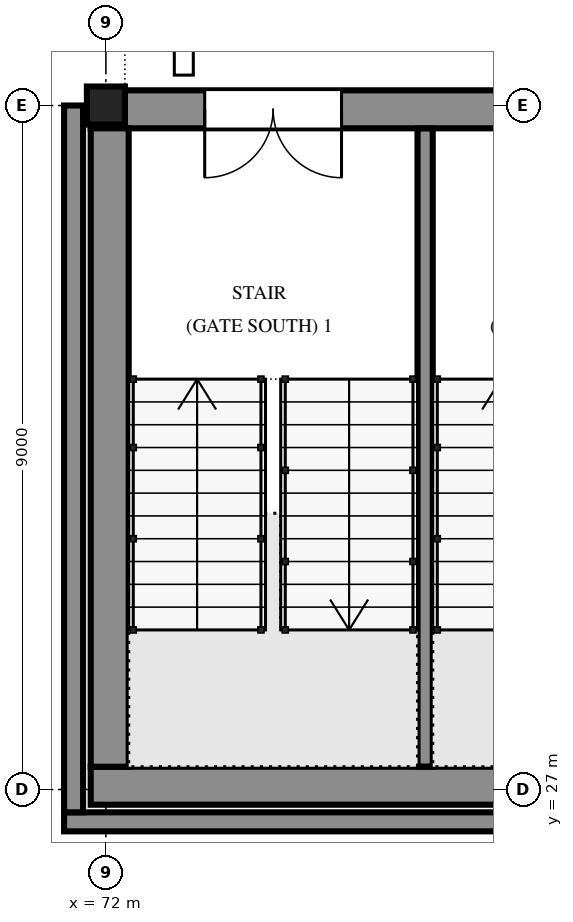
"""IFC4 building model, lengths in metres.
Left out: names, types, materials, properties, quantities, classifications, styles, units other than length and angle.
Written with IfcOpenShell. Run it as: python <this file> out.ifc"""

import sys

from ifc_helpers import new_model, si_unit, direction, frame, frame_2d, origin, origin_2d, place, context, subcontext, project, spatial, polyline, rectangle, hollow_rectangle, outline, extrude, element, fill, save


model = new_model("IFC4")
c1 = context("Model", 3, precision=1e-05, world=origin(), true_north=direction((0.0, 1.0)))
c2 = subcontext(c1, "Body", "Model", "MODEL_VIEW")
j1 = project(units=[si_unit("LENGTHUNIT", "METRE"), si_unit("PLANEANGLEUNIT", "RADIAN")], contexts=[c1])
p1 = place(None, origin())
s1 = spatial("IfcSite", under=j1, at=p1, CompositionType="ELEMENT")
p2 = place(p1, origin())
s2 = spatial("IfcBuilding", under=s1, at=p2, CompositionType="ELEMENT")
p3 = place(p2, frame((0.0, 0.0, 11.7)))
s3 = spatial("IfcBuildingStorey", under=s2, at=p3, CompositionType="ELEMENT", Elevation=11.7)
p4 = place(p3, frame((72.0, 36.0, 0.0), z_axis=(0.0, 0.0, 1.0), x_axis=(1.0, 0.0, 0.0)))
e1 = element("IfcColumn", 1, at=p4, inside=s3, PredefinedType="COLUMN", context=c2, shape_type="SweptSolid", body=[
    extrude(hollow_rectangle(XDim=0.5, YDim=0.5, WallThickness=0.032, at=origin_2d()), origin(), (0.0, 0.0, 1.0), 4.2),
])
p5 = place(p3, frame((71.8, 27.05, 0.0), z_axis=(0.0, 0.0, 1.0), x_axis=(1.0, 0.0, 0.0)))
e2 = element("IfcWall", 2, at=p5, inside=s3, PredefinedType="SOLIDWALL", context=c2, shape_type="SweptSolid", body=[
    extrude(rectangle(XDim=18.4, YDim=0.5, at=frame_2d((9.2, 0.0))), origin(), (0.0, 0.0, 1.0), 4.2),
])
p6 = place(p3, frame((71.8, 35.95, 0.0), z_axis=(0.0, 0.0, 1.0), x_axis=(1.0, 0.0, 0.0)))
e3 = element("IfcWall", 3, at=p6, inside=s3, PredefinedType="SOLIDWALL", context=c2, shape_type="SweptSolid", body=[
    extrude(rectangle(XDim=18.4, YDim=0.5, at=frame_2d((9.2, 0.0))), origin(), (0.0, 0.0, 1.0), 4.2),
])
p7 = place(p6, frame((1.5, 0.0, 0.0)))
e4 = element("IfcOpeningElement", 4, at=p7, cuts=e3, PredefinedType="OPENING", context=c2, shape_type="SweptSolid", body=[
    extrude(rectangle(XDim=1.8, YDim=2.1, at=frame_2d((0.9, 1.05))), frame((0.0, 0.26, 0.0), z_axis=(0.0, -1.0, 0.0), x_axis=(1.0, 0.0, 0.0)), (0.0, 0.0, 1.0), 0.52),
])
p8 = place(p6, frame((5.5, 0.0, 0.0)))
e5 = element("IfcOpeningElement", 5, at=p8, cuts=e3, PredefinedType="OPENING", context=c2, shape_type="SweptSolid", body=[
    extrude(rectangle(XDim=1.8, YDim=2.1, at=frame_2d((0.9, 1.05))), frame((0.0, 0.26, 0.0), z_axis=(0.0, -1.0, 0.0), x_axis=(1.0, 0.0, 0.0)), (0.0, 0.0, 1.0), 0.52),
])
p9 = place(p6, frame((9.0, 0.0, 0.0)))
e6 = element("IfcOpeningElement", 6, at=p9, cuts=e3, PredefinedType="OPENING", context=c2, shape_type="SweptSolid", body=[
    extrude(rectangle(XDim=1.8, YDim=2.1, at=frame_2d((0.9, 1.05))), frame((0.0, 0.26, 0.0), z_axis=(0.0, -1.0, 0.0), x_axis=(1.0, 0.0, 0.0)), (0.0, 0.0, 1.0), 0.52),
])
p10 = place(p6, frame((16.15, 0.0, 0.0)))
e7 = element("IfcOpeningElement", 7, at=p10, cuts=e3, PredefinedType="OPENING", context=c2, shape_type="SweptSolid", body=[
    extrude(rectangle(XDim=0.9, YDim=2.1, at=frame_2d((0.45, 1.05))), frame((0.0, 0.26, 0.0), z_axis=(0.0, -1.0, 0.0), x_axis=(1.0, 0.0, 0.0)), (0.0, 0.0, 1.0), 0.52),
])
p11 = place(p3, frame((72.05, 27.3, 0.0), z_axis=(0.0, 0.0, 1.0), x_axis=(0.0, 1.0, 0.0)))
e8 = element("IfcWall", 8, at=p11, inside=s3, PredefinedType="SOLIDWALL", context=c2, shape_type="SweptSolid", body=[
    extrude(rectangle(XDim=8.4, YDim=0.5, at=frame_2d((4.2, 0.0))), origin(), (0.0, 0.0, 1.0), 4.2),
])
p12 = place(p3, frame((71.45, 26.575, 0.0), z_axis=(0.0, 0.0, 1.0), x_axis=(1.0, 0.0, 0.0)))
e9 = element("IfcWall", 9, at=p12, inside=s3, PredefinedType="SOLIDWALL", context=c2, shape_type="SweptSolid", body=[
    extrude(outline(polyline([(0.0, 0.0), (19.1, 0.0), (19.1, 12.6), (0.0, 12.6), (0.0, 0.0)]), holes=[polyline([(1.308, 2.439), (1.352, 2.546), (1.408, 2.646), (1.475, 2.74), (1.552, 2.826), (1.638, 2.903), (1.732, 2.969), (1.833, 3.025), (1.939, 3.068), (2.05, 3.1), (2.161, 3.068), (2.267, 3.025), (2.368, 2.969), (2.462, 2.903), (2.549, 2.826), (2.625, 2.74), (2.692, 2.646), (2.748, 2.546), (2.792, 2.439), (2.824, 2.329), (2.844, 2.215), (2.85, 2.1), (2.85, 0.6), (1.25, 0.6), (1.25, 2.1), (1.257, 2.215), (1.276, 2.329), (1.308, 2.439)]), polyline([(4.308, 2.439), (4.352, 2.546), (4.408, 2.646), (4.475, 2.74), (4.552, 2.826), (4.638, 2.903), (4.732, 2.969), (4.833, 3.025), (4.939, 3.068), (5.05, 3.1), (5.161, 3.068), (5.267, 3.025), (5.368, 2.969), (5.462, 2.903), (5.549, 2.826), (5.625, 2.74), (5.692, 2.646), (5.748, 2.546), (5.792, 2.439), (5.824, 2.329), (5.844, 2.215), (5.85, 2.1), (5.85, 0.6), (4.25, 0.6), (4.25, 2.1), (4.257, 2.215), (4.276, 2.329), (4.308, 2.439)]), polyline([(7.308, 2.439), (7.352, 2.546), (7.408, 2.646), (7.475, 2.74), (7.552, 2.826), (7.638, 2.903), (7.732, 2.969), (7.833, 3.025), (7.939, 3.068), (8.05, 3.1), (8.161, 3.068), (8.267, 3.025), (8.368, 2.969), (8.462, 2.903), (8.549, 2.826), (8.625, 2.74), (8.692, 2.646), (8.748, 2.546), (8.792, 2.439), (8.824, 2.329), (8.844, 2.215), (8.85, 2.1), (8.85, 0.6), (7.25, 0.6), (7.25, 2.1), (7.257, 2.215), (7.276, 2.329), (7.308, 2.439)]), polyline([(1.308, 6.639), (1.352, 6.746), (1.408, 6.846), (1.475, 6.94), (1.552, 7.026), (1.638, 7.103), (1.732, 7.169), (1.833, 7.225), (1.939, 7.269), (2.05, 7.3), (2.161, 7.269), (2.267, 7.225), (2.368, 7.169), (2.462, 7.103), (2.549, 7.026), (2.625, 6.94), (2.692, 6.846), (2.748, 6.746), (2.792, 6.639), (2.824, 6.529), (2.844, 6.415), (2.85, 6.3), (2.85, 4.8), (1.25, 4.8), (1.25, 6.3), (1.257, 6.415), (1.276, 6.529), (1.308, 6.639)]), polyline([(4.308, 6.639), (4.352, 6.746), (4.408, 6.846), (4.475, 6.94), (4.552, 7.026), (4.638, 7.103), (4.732, 7.169), (4.833, 7.225), (4.939, 7.269), (5.05, 7.3), (5.161, 7.269), (5.267, 7.225), (5.368, 7.169), (5.462, 7.103), (5.549, 7.026), (5.625, 6.94), (5.692, 6.846), (5.748, 6.746), (5.792, 6.639), (5.824, 6.529), (5.844, 6.415), (5.85, 6.3), (5.85, 4.8), (4.25, 4.8), (4.25, 6.3), (4.257, 6.415), (4.276, 6.529), (4.308, 6.639)]), polyline([(7.308, 6.639), (7.352, 6.746), (7.408, 6.846), (7.475, 6.94), (7.552, 7.026), (7.638, 7.103), (7.732, 7.169), (7.833, 7.225), (7.939, 7.269), (8.05, 7.3), (8.161, 7.269), (8.267, 7.225), (8.368, 7.169), (8.462, 7.103), (8.549, 7.026), (8.625, 6.94), (8.692, 6.846), (8.748, 6.746), (8.792, 6.639), (8.824, 6.529), (8.844, 6.415), (8.85, 6.3), (8.85, 4.8), (7.25, 4.8), (7.25, 6.3), (7.257, 6.415), (7.276, 6.529), (7.308, 6.639)]), polyline([(1.308, 10.839), (1.352, 10.946), (1.408, 11.046), (1.475, 11.14), (1.552, 11.226), (1.638, 11.303), (1.732, 11.369), (1.833, 11.425), (1.939, 11.469), (2.05, 11.5), (2.161, 11.469), (2.267, 11.425), (2.368, 11.369), (2.462, 11.303), (2.549, 11.226), (2.625, 11.14), (2.692, 11.046), (2.748, 10.946), (2.792, 10.839), (2.824, 10.729), (2.844, 10.615), (2.85, 10.5), (2.85, 9.0), (1.25, 9.0), (1.25, 10.5), (1.257, 10.615), (1.276, 10.729), (1.308, 10.839)]), polyline([(4.352, 10.946), (4.408, 11.046), (4.475, 11.14), (4.552, 11.226), (4.638, 11.303), (4.732, 11.369), (4.833, 11.425), (4.939, 11.469), (5.05, 11.5), (5.161, 11.469), (5.267, 11.425), (5.368, 11.369), (5.462, 11.303), (5.549, 11.226), (5.625, 11.14), (5.692, 11.046), (5.748, 10.946), (5.792, 10.839), (5.824, 10.729), (5.844, 10.615), (5.85, 10.5), (5.85, 9.0), (4.25, 9.0), (4.25, 10.5), (4.257, 10.615), (4.276, 10.729), (4.308, 10.839), (4.352, 10.946)]), polyline([(7.352, 10.946), (7.408, 11.046), (7.475, 11.14), (7.552, 11.226), (7.638, 11.303), (7.732, 11.369), (7.833, 11.425), (7.939, 11.469), (8.05, 11.5), (8.161, 11.469), (8.267, 11.425), (8.368, 11.369), (8.462, 11.303), (8.549, 11.226), (8.625, 11.14), (8.692, 11.046), (8.748, 10.946), (8.792, 10.839), (8.824, 10.729), (8.844, 10.615), (8.85, 10.5), (8.85, 9.0), (7.25, 9.0), (7.25, 10.5), (7.257, 10.615), (7.276, 10.729), (7.308, 10.839), (7.352, 10.946)]), polyline([(10.308, 2.439), (10.352, 2.546), (10.408, 2.646), (10.475, 2.74), (10.552, 2.826), (10.638, 2.903), (10.732, 2.969), (10.833, 3.025), (10.939, 3.068), (11.05, 3.1), (11.161, 3.068), (11.267, 3.025), (11.368, 2.969), (11.462, 2.903), (11.549, 2.826), (11.625, 2.74), (11.692, 2.646), (11.748, 2.546), (11.792, 2.439), (11.824, 2.329), (11.844, 2.215), (11.85, 2.1), (11.85, 0.6), (10.25, 0.6), (10.25, 2.1), (10.257, 2.215), (10.276, 2.329), (10.308, 2.439)]), polyline([(13.308, 2.439), (13.352, 2.546), (13.408, 2.646), (13.475, 2.74), (13.552, 2.826), (13.638, 2.903), (13.732, 2.969), (13.833, 3.025), (13.939, 3.068), (14.05, 3.1), (14.161, 3.068), (14.267, 3.025), (14.368, 2.969), (14.462, 2.903), (14.549, 2.826), (14.625, 2.74), (14.692, 2.646), (14.748, 2.546), (14.792, 2.439), (14.824, 2.329), (14.844, 2.215), (14.85, 2.1), (14.85, 0.6), (13.25, 0.6), (13.25, 2.1), (13.257, 2.215), (13.276, 2.329), (13.308, 2.439)]), polyline([(16.308, 2.439), (16.352, 2.546), (16.408, 2.646), (16.475, 2.74), (16.552, 2.826), (16.638, 2.903), (16.732, 2.969), (16.833, 3.025), (16.939, 3.068), (17.05, 3.1), (17.161, 3.068), (17.267, 3.025), (17.368, 2.969), (17.462, 2.903), (17.549, 2.826), (17.625, 2.74), (17.692, 2.646), (17.748, 2.546), (17.792, 2.439), (17.824, 2.329), (17.844, 2.215), (17.85, 2.1), (17.85, 0.6), (16.25, 0.6), (16.25, 2.1), (16.257, 2.215), (16.276, 2.329), (16.308, 2.439)]), polyline([(10.308, 6.639), (10.352, 6.746), (10.408, 6.846), (10.475, 6.94), (10.552, 7.026), (10.638, 7.103), (10.732, 7.169), (10.833, 7.225), (10.939, 7.269), (11.05, 7.3), (11.161, 7.269), (11.267, 7.225), (11.368, 7.169), (11.462, 7.103), (11.549, 7.026), (11.625, 6.94), (11.692, 6.846), (11.748, 6.746), (11.792, 6.639), (11.824, 6.529), (11.844, 6.415), (11.85, 6.3), (11.85, 4.8), (10.25, 4.8), (10.25, 6.3), (10.257, 6.415), (10.276, 6.529), (10.308, 6.639)]), polyline([(13.308, 6.639), (13.352, 6.746), (13.408, 6.846), (13.475, 6.94), (13.552, 7.026), (13.638, 7.103), (13.732, 7.169), (13.833, 7.225), (13.939, 7.269), (14.05, 7.3), (14.161, 7.269), (14.267, 7.225), (14.368, 7.169), (14.462, 7.103), (14.549, 7.026), (14.625, 6.94), (14.692, 6.846), (14.748, 6.746), (14.792, 6.639), (14.824, 6.529), (14.844, 6.415), (14.85, 6.3), (14.85, 4.8), (13.25, 4.8), (13.25, 6.3), (13.257, 6.415), (13.276, 6.529), (13.308, 6.639)]), polyline([(16.308, 6.639), (16.352, 6.746), (16.408, 6.846), (16.475, 6.94), (16.552, 7.026), (16.638, 7.103), (16.732, 7.169), (16.833, 7.225), (16.939, 7.269), (17.05, 7.3), (17.161, 7.269), (17.267, 7.225), (17.368, 7.169), (17.462, 7.103), (17.549, 7.026), (17.625, 6.94), (17.692, 6.846), (17.748, 6.746), (17.792, 6.639), (17.824, 6.529), (17.844, 6.415), (17.85, 6.3), (17.85, 4.8), (16.25, 4.8), (16.25, 6.3), (16.257, 6.415), (16.276, 6.529), (16.308, 6.639)]), polyline([(10.308, 10.839), (10.352, 10.946), (10.408, 11.046), (10.475, 11.14), (10.552, 11.226), (10.638, 11.303), (10.732, 11.369), (10.833, 11.425), (10.939, 11.469), (11.05, 11.5), (11.161, 11.469), (11.267, 11.425), (11.368, 11.369), (11.462, 11.303), (11.549, 11.226), (11.625, 11.14), (11.692, 11.046), (11.748, 10.946), (11.792, 10.839), (11.824, 10.729), (11.844, 10.615), (11.85, 10.5), (11.85, 9.0), (10.25, 9.0), (10.25, 10.5), (10.257, 10.615), (10.276, 10.729), (10.308, 10.839)]), polyline([(13.352, 10.946), (13.408, 11.046), (13.475, 11.14), (13.552, 11.226), (13.638, 11.303), (13.732, 11.369), (13.833, 11.425), (13.939, 11.469), (14.05, 11.5), (14.161, 11.469), (14.267, 11.425), (14.368, 11.369), (14.462, 11.303), (14.549, 11.226), (14.625, 11.14), (14.692, 11.046), (14.748, 10.946), (14.792, 10.839), (14.824, 10.729), (14.844, 10.615), (14.85, 10.5), (14.85, 9.0), (13.25, 9.0), (13.25, 10.5), (13.257, 10.615), (13.276, 10.729), (13.308, 10.839), (13.352, 10.946)]), polyline([(16.352, 10.946), (16.408, 11.046), (16.475, 11.14), (16.552, 11.226), (16.638, 11.303), (16.732, 11.369), (16.833, 11.425), (16.939, 11.469), (17.05, 11.5), (17.161, 11.469), (17.267, 11.425), (17.368, 11.369), (17.462, 11.303), (17.549, 11.226), (17.625, 11.14), (17.692, 11.046), (17.748, 10.946), (17.792, 10.839), (17.824, 10.729), (17.844, 10.615), (17.85, 10.5), (17.85, 9.0), (16.25, 9.0), (16.25, 10.5), (16.257, 10.615), (16.276, 10.729), (16.308, 10.839), (16.352, 10.946)])]), frame((0.0, 0.125, 0.0), z_axis=(0.0, -1.0, 0.0), x_axis=(1.0, 0.0, 0.0)), (0.0, 0.0, 1.0), 0.25),
])
p13 = place(p3, frame((71.575, 26.7, 0.0), z_axis=(0.0, 0.0, 1.0), x_axis=(0.0, 1.0, 0.0)))
e10 = element("IfcWall", 10, at=p13, inside=s3, PredefinedType="SOLIDWALL", context=c2, shape_type="SweptSolid", body=[
    extrude(outline(polyline([(0.0, 0.0), (9.3, 0.0), (9.3, 12.6), (0.0, 12.6), (0.0, 0.0)]), holes=[polyline([(2.356, 2.215), (2.376, 2.329), (2.408, 2.439), (2.452, 2.546), (2.508, 2.646), (2.575, 2.74), (2.652, 2.826), (2.738, 2.903), (2.832, 2.969), (2.933, 3.025), (3.039, 3.068), (3.15, 3.1), (3.261, 3.068), (3.367, 3.025), (3.468, 2.969), (3.562, 2.903), (3.648, 2.826), (3.725, 2.74), (3.792, 2.646), (3.848, 2.546), (3.892, 2.439), (3.924, 2.329), (3.944, 2.215), (3.95, 2.1), (3.95, 0.6), (2.35, 0.6), (2.35, 2.1), (2.356, 2.215)]), polyline([(5.376, 2.329), (5.408, 2.439), (5.452, 2.546), (5.508, 2.646), (5.575, 2.74), (5.652, 2.826), (5.738, 2.903), (5.832, 2.969), (5.933, 3.025), (6.039, 3.068), (6.15, 3.1), (6.261, 3.068), (6.367, 3.025), (6.468, 2.969), (6.562, 2.903), (6.648, 2.826), (6.725, 2.74), (6.792, 2.646), (6.848, 2.546), (6.892, 2.439), (6.924, 2.329), (6.944, 2.215), (6.95, 2.1), (6.95, 0.6), (5.35, 0.6), (5.35, 2.1), (5.356, 2.215), (5.376, 2.329)]), polyline([(2.376, 6.529), (2.408, 6.639), (2.452, 6.746), (2.508, 6.846), (2.575, 6.94), (2.652, 7.026), (2.738, 7.103), (2.832, 7.169), (2.933, 7.225), (3.039, 7.269), (3.15, 7.3), (3.261, 7.269), (3.367, 7.225), (3.468, 7.169), (3.562, 7.103), (3.648, 7.026), (3.725, 6.94), (3.792, 6.846), (3.848, 6.746), (3.892, 6.639), (3.924, 6.529), (3.944, 6.415), (3.95, 6.3), (3.95, 4.8), (2.35, 4.8), (2.35, 6.3), (2.356, 6.415), (2.376, 6.529)]), polyline([(5.356, 6.415), (5.376, 6.529), (5.408, 6.639), (5.452, 6.746), (5.508, 6.846), (5.575, 6.94), (5.652, 7.026), (5.738, 7.103), (5.832, 7.169), (5.933, 7.225), (6.039, 7.269), (6.15, 7.3), (6.261, 7.269), (6.367, 7.225), (6.468, 7.169), (6.562, 7.103), (6.648, 7.026), (6.725, 6.94), (6.792, 6.846), (6.848, 6.746), (6.892, 6.639), (6.924, 6.529), (6.944, 6.415), (6.95, 6.3), (6.95, 4.8), (5.35, 4.8), (5.35, 6.3), (5.356, 6.415)]), polyline([(2.376, 10.729), (2.408, 10.839), (2.452, 10.946), (2.508, 11.046), (2.575, 11.14), (2.652, 11.226), (2.738, 11.303), (2.832, 11.369), (2.933, 11.425), (3.039, 11.469), (3.15, 11.5), (3.261, 11.469), (3.367, 11.425), (3.468, 11.369), (3.562, 11.303), (3.648, 11.226), (3.725, 11.14), (3.792, 11.046), (3.848, 10.946), (3.892, 10.839), (3.924, 10.729), (3.944, 10.615), (3.95, 10.5), (3.95, 9.0), (2.35, 9.0), (2.35, 10.5), (2.356, 10.615), (2.376, 10.729)]), polyline([(5.376, 10.729), (5.408, 10.839), (5.452, 10.946), (5.508, 11.046), (5.575, 11.14), (5.652, 11.226), (5.738, 11.303), (5.832, 11.369), (5.933, 11.425), (6.039, 11.469), (6.15, 11.5), (6.261, 11.469), (6.367, 11.425), (6.468, 11.369), (6.562, 11.303), (6.648, 11.226), (6.725, 11.14), (6.792, 11.046), (6.848, 10.946), (6.892, 10.839), (6.924, 10.729), (6.944, 10.615), (6.95, 10.5), (6.95, 9.0), (5.35, 9.0), (5.35, 10.5), (5.356, 10.615), (5.376, 10.729)])]), frame((0.0, 0.125, 0.0), z_axis=(0.0, -1.0, 0.0), x_axis=(1.0, 0.0, 0.0)), (0.0, 0.0, 1.0), 0.25),
])
p14 = place(p3, frame((76.2, 27.302, -0.15), z_axis=(0.0, 0.0, 1.0), x_axis=(0.0, 1.0, 0.0)))
e11 = element("IfcWall", 11, at=p14, inside=s3, PredefinedType="SOLIDWALL", context=c2, shape_type="SweptSolid", body=[
    extrude(rectangle(XDim=8.396, YDim=0.2, at=frame_2d((4.198, 0.0))), origin(), (0.0, 0.0, 1.0), 3.666),
])
p15 = place(p7, frame((1.8, 0.0, 0.0), z_axis=(0.0, 0.0, 1.0), x_axis=(-1.0, 0.0, 0.0)))
e12 = element("IfcDoor", 12, at=p15, inside=s3, OperationType="DOUBLE_DOOR_SINGLE_SWING", PredefinedType="DOOR", context=c2, shape_type="SweptSolid", body=[
    extrude(outline(polyline([(0.0, 0.0), (0.07, 0.0), (0.07, 2.03), (1.73, 2.03), (1.73, 0.0), (1.8, 0.0), (1.8, 2.1), (0.0, 2.1), (0.0, 0.0)])), frame((0.0, 0.025, 0.0), z_axis=(0.0, -1.0, 0.0), x_axis=(1.0, 0.0, 0.0)), (0.0, 0.0, 1.0), 0.05),
    extrude(outline(polyline([(0.074, 0.01), (0.897, 0.01), (0.897, 2.026), (0.074, 2.026), (0.074, 0.01)]), holes=[polyline([(0.194, 0.16), (0.777, 0.16), (0.777, 1.01), (0.194, 1.01), (0.194, 0.16)]), polyline([(0.335, 1.16), (0.635, 1.16), (0.635, 1.76), (0.335, 1.76), (0.335, 1.16)])]), frame((0.0, 0.017, 0.0), z_axis=(0.0, -1.0, 0.0), x_axis=(1.0, 0.0, 0.0)), (0.0, 0.0, 1.0), 0.035),
    extrude(rectangle(XDim=0.583, YDim=0.85, at=frame_2d((0.485, 0.585))), frame((0.0, 0.009, 0.0), z_axis=(0.0, -1.0, 0.0), x_axis=(1.0, 0.0, 0.0)), (0.0, 0.0, 1.0), 0.017),
    extrude(rectangle(XDim=0.3, YDim=0.6, at=frame_2d((0.485, 1.46))), frame((0.0, 0.006, 0.0), z_axis=(0.0, -1.0, 0.0), x_axis=(1.0, 0.0, 0.0)), (0.0, 0.0, 1.0), 0.012),
    extrude(outline(polyline([(0.903, 0.01), (1.726, 0.01), (1.726, 2.026), (0.903, 2.026), (0.903, 0.01)]), holes=[polyline([(1.023, 0.16), (1.606, 0.16), (1.606, 1.01), (1.023, 1.01), (1.023, 0.16)]), polyline([(1.165, 1.16), (1.465, 1.16), (1.465, 1.76), (1.165, 1.76), (1.165, 1.16)])]), frame((0.0, 0.017, 0.0), z_axis=(0.0, -1.0, 0.0), x_axis=(1.0, 0.0, 0.0)), (0.0, 0.0, 1.0), 0.035),
    extrude(rectangle(XDim=0.583, YDim=0.85, at=frame_2d((1.314, 0.585))), frame((0.0, 0.009, 0.0), z_axis=(0.0, -1.0, 0.0), x_axis=(1.0, 0.0, 0.0)), (0.0, 0.0, 1.0), 0.017),
    extrude(rectangle(XDim=0.3, YDim=0.6, at=frame_2d((1.314, 1.46))), frame((0.0, 0.006, 0.0), z_axis=(0.0, -1.0, 0.0), x_axis=(1.0, 0.0, 0.0)), (0.0, 0.0, 1.0), 0.012),
])
fill(e4, e12)
save(model, sys.argv[1])
